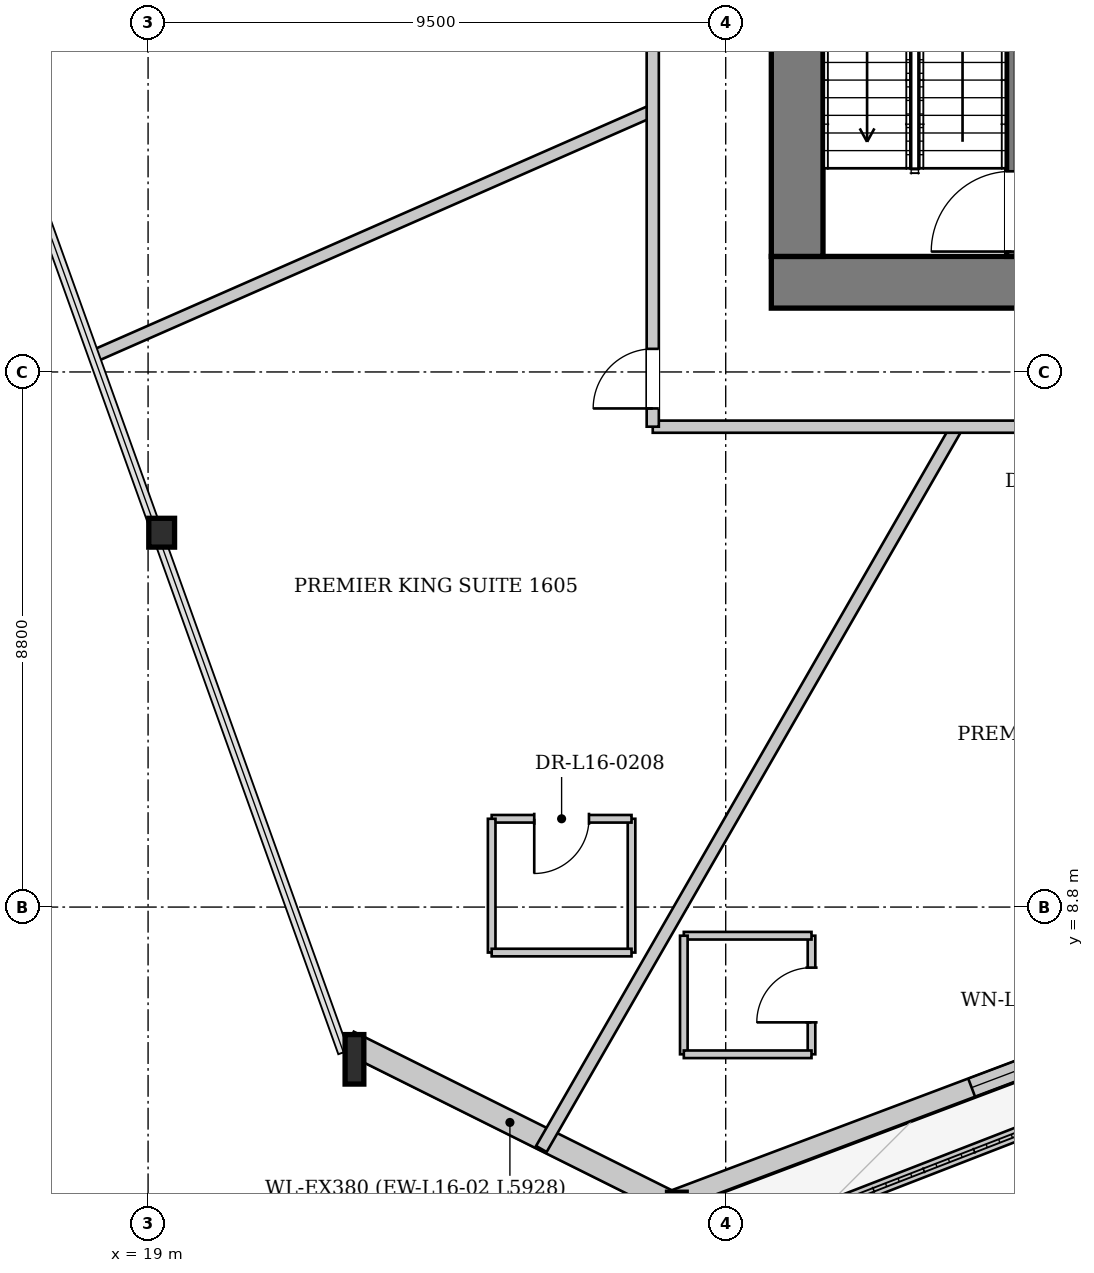
"""IFC4 building model, lengths in metres.
Left out: names, types, materials, properties, quantities, classifications, styles, units other than length and angle.
Written with IfcOpenShell. Run it as: python <this file> out.ifc"""

import sys

from ifc_helpers import new_model, si_unit, direction, frame, frame_2d, origin, origin_2d, place, context, subcontext, project, spatial, rectangle, i_section, extrude, source, transform, mapped, element, fill, save


model = new_model("IFC4")
c1 = context("Model", 3, precision=1e-05, world=origin(), true_north=direction((0.0, 1.0)))
c2 = subcontext(c1, "Body", "Model", "MODEL_VIEW")
j1 = project(units=[si_unit("LENGTHUNIT", "METRE"), si_unit("PLANEANGLEUNIT", "RADIAN")], contexts=[c1])
p1 = place(None, origin())
s1 = spatial("IfcSite", under=j1, at=p1, CompositionType="ELEMENT")
p2 = place(p1, origin())
s2 = spatial("IfcBuilding", under=s1, at=p2, CompositionType="ELEMENT")
p3 = place(p2, frame((0.0, 0.0, 64.8)))
s3 = spatial("IfcBuildingStorey", under=s2, at=p3, CompositionType="ELEMENT", Elevation=64.8)
m1 = source(origin(), c2, "Body", "SweptSolid", [
    extrude(i_section(OverallWidth=0.424, OverallDepth=0.474, WebThickness=0.043, FlangeThickness=0.068, at=origin_2d()), origin(), (0.0, 0.0, 1.0), 3.406),
])
p4 = place(p3, frame((19.098, 15.097, 0.0), z_axis=(0.07368847903, -0.082505291209, 0.993862608704), x_axis=(0.745834176897, 0.666131654084, 0.0)))
e1 = element("IfcColumn", 1, at=p4, inside=s3, PredefinedType="COLUMN", context=c2, shape_type="MappedRepresentation", body=[
    mapped(m1, transform((0.0, 0.0, 0.0), x_axis=(1.0, 0.0, 0.0), y_axis=(0.0, 1.0, 0.0), z_axis=(0.0, 0.0, 1.0), scale=1.0)),
])
m2 = source(origin(), c2, "Body", "SweptSolid", [
    extrude(i_section(OverallWidth=0.308, OverallDepth=0.814, WebThickness=0.021, FlangeThickness=0.04, at=origin_2d()), origin(), (0.0, 0.0, 1.0), 3.412),
])
p5 = place(p3, frame((22.214, 6.411, 0.0), z_axis=(0.105901272253, -0.067118509036, 0.992108878239), x_axis=(0.535323603489, 0.844647050281, 0.0)))
e2 = element("IfcColumn", 2, at=p5, inside=s3, PredefinedType="COLUMN", context=c2, shape_type="MappedRepresentation", body=[
    mapped(m2, transform((0.0, 0.0, 0.0), x_axis=(1.0, 0.0, 0.0), y_axis=(0.0, 1.0, 0.0), z_axis=(0.0, 0.0, 1.0), scale=1.0)),
])
p6 = place(p3, frame((50.249, 12.503, 0.0), z_axis=(0.0, 0.0, 1.0), x_axis=(-0.935754406197, -0.352652366054, 0.0)))
e3 = element("IfcWall", 3, at=p6, inside=s3, PredefinedType="SOLIDWALL", context=c2, shape_type="SweptSolid", body=[
    extrude(rectangle(XDim=24.352, YDim=0.32, at=frame_2d((12.176, 0.0))), origin(), (0.0, 0.0, 1.0), 2.592),
])
p7 = place(p6, frame((7.242, 0.0, 0.0)))
e4 = element("IfcOpeningElement", 4, at=p7, cuts=e3, PredefinedType="OPENING", context=c2, shape_type="SweptSolid", body=[
    extrude(rectangle(XDim=1.1, YDim=2.3, at=frame_2d((0.55, 1.15))), frame((0.0, 0.17, 0.0), z_axis=(0.0, -1.0, 0.0), x_axis=(1.0, 0.0, 0.0)), (0.0, 0.0, 1.0), 0.34),
])
p8 = place(p6, frame((17.12, 0.0, 0.272)))
e5 = element("IfcOpeningElement", 5, at=p8, cuts=e3, PredefinedType="OPENING", context=c2, shape_type="SweptSolid", body=[
    extrude(rectangle(XDim=1.8, YDim=2.2, at=frame_2d((0.9, 1.1))), frame((0.0, 0.17, 0.0), z_axis=(0.0, -1.0, 0.0), x_axis=(1.0, 0.0, 0.0)), (0.0, 0.0, 1.0), 0.34),
])
p9 = place(p3, frame((27.603, 3.936, 0.0), z_axis=(0.0, 0.0, 1.0), x_axis=(-0.894929094808, 0.446208376508, 0.0)))
e6 = element("IfcWall", 6, at=p9, inside=s3, PredefinedType="SOLIDWALL", context=c2, shape_type="SweptSolid", body=[
    extrude(rectangle(XDim=5.928, YDim=0.38, at=frame_2d((2.964, 0.0))), origin(), (0.0, 0.0, 1.0), 2.592),
])
p10 = place(p3, frame((28.714, 3.29, 0.0), z_axis=(0.0, 0.0, 1.0), x_axis=(0.932244858771, 0.361828030003, 0.0)))
e7 = element("IfcWall", 7, at=p10, inside=s3, PredefinedType="PARAPET", context=c2, shape_type="SweptSolid", body=[
    extrude(rectangle(XDim=21.613, YDim=0.22, at=frame_2d((10.807, 0.0))), origin(), (0.0, 0.0, 1.0), 0.3),
])
p11 = place(p3, frame((46.75, 19.075, 0.0), z_axis=(0.0, 0.0, 1.0), x_axis=(-1.0, 0.0, 0.0)))
e8 = element("IfcWall", 8, at=p11, inside=s3, PredefinedType="SHEAR", context=c2, shape_type="SweptSolid", body=[
    extrude(rectangle(XDim=17.5, YDim=0.85, at=frame_2d((8.75, 0.0))), origin(), (0.0, 0.0, 1.0), 3.3),
])
p12 = place(p11, frame((4.95, 0.0, 0.0)))
e9 = element("IfcOpeningElement", 9, at=p12, cuts=e8, PredefinedType="OPENING", context=c2, shape_type="SweptSolid", body=[
    extrude(rectangle(XDim=1.12, YDim=2.25, at=frame_2d((0.56, 1.125))), frame((0.0, 0.435, 0.0), z_axis=(0.0, -1.0, 0.0), x_axis=(1.0, 0.0, 0.0)), (0.0, 0.0, 1.0), 0.87),
])
p13 = place(p11, frame((11.45, 0.0, 0.0)))
e10 = element("IfcOpeningElement", 10, at=p13, cuts=e8, PredefinedType="OPENING", context=c2, shape_type="SweptSolid", body=[
    extrude(rectangle(XDim=1.12, YDim=2.25, at=frame_2d((0.56, 1.125))), frame((0.0, 0.435, 0.0), z_axis=(0.0, -1.0, 0.0), x_axis=(1.0, 0.0, 0.0)), (0.0, 0.0, 1.0), 0.87),
])
p14 = place(p3, frame((29.675, 19.5, 0.0), z_axis=(0.0, 0.0, 1.0), x_axis=(0.0, 1.0, 0.0)))
e11 = element("IfcWall", 11, at=p14, inside=s3, PredefinedType="SHEAR", context=c2, shape_type="SweptSolid", body=[
    extrude(rectangle(XDim=14.2, YDim=0.85, at=frame_2d((7.1, 0.0))), origin(), (0.0, 0.0, 1.0), 3.3),
])
p15 = place(p14, frame((7.42, 0.0, 0.0)))
e12 = element("IfcOpeningElement", 12, at=p15, cuts=e11, PredefinedType="OPENING", context=c2, shape_type="SweptSolid", body=[
    extrude(rectangle(XDim=1.6, YDim=2.2, at=frame_2d((0.8, 1.1))), frame((0.0, 0.435, 0.0), z_axis=(0.0, -1.0, 0.0), x_axis=(1.0, 0.0, 0.0)), (0.0, 0.0, 1.0), 0.87),
])
p16 = place(p3, frame((33.2, 19.5, 0.0), z_axis=(0.0, 0.0, 1.0), x_axis=(0.0, 1.0, 0.0)))
e13 = element("IfcWall", 13, at=p16, inside=s3, PredefinedType="PARTITIONING", context=c2, shape_type="SweptSolid", body=[
    extrude(rectangle(XDim=7.46, YDim=0.16, at=frame_2d((3.73, 0.0))), origin(), (0.0, 0.0, 1.0), 3.3),
])
p17 = place(p16, frame((0.08, 0.0, 0.0)))
e14 = element("IfcOpeningElement", 14, at=p17, cuts=e13, PredefinedType="OPENING", context=c2, shape_type="SweptSolid", body=[
    extrude(rectangle(XDim=1.32, YDim=2.2, at=frame_2d((0.66, 1.1))), frame((0.0, 0.09, 0.0), z_axis=(0.0, -1.0, 0.0), x_axis=(1.0, 0.0, 0.0)), (0.0, 0.0, 1.0), 0.18),
])
p18 = place(p3, frame((27.3, 21.899, 0.0), z_axis=(0.0, 0.0, 1.0), x_axis=(-0.915540001972, -0.402226931955, 0.0)))
e15 = element("IfcWall", 15, at=p18, inside=s3, PredefinedType="PARTITIONING", context=c2, shape_type="SweptSolid", body=[
    extrude(rectangle(XDim=10.011, YDim=0.2, at=frame_2d((5.005, 0.0))), origin(), (0.0, 0.0, 1.0), 3.3),
])
p19 = place(p3, frame((32.303, 16.7, 0.0), z_axis=(0.0, 0.0, 1.0), x_axis=(-0.498759278796, -0.866740550462, 0.0)))
e16 = element("IfcWall", 16, at=p19, inside=s3, PredefinedType="PARTITIONING", context=c2, shape_type="SweptSolid", body=[
    extrude(rectangle(XDim=13.704, YDim=0.2, at=frame_2d((6.852, 0.0))), origin(), (0.0, 0.0, 1.0), 3.3),
])
p20 = place(p3, frame((26.951, 8.052, 0.0), z_axis=(0.0, 0.0, 1.0), x_axis=(0.0, 1.0, 0.0)))
e17 = element("IfcWall", 17, at=p20, inside=s3, PredefinedType="PARTITIONING", context=c2, shape_type="SweptSolid", body=[
    extrude(rectangle(XDim=2.2, YDim=0.125, at=frame_2d((1.1, 0.0))), origin(), (0.0, 0.0, 1.0), 3.3),
])
p21 = place(p3, frame((26.951, 10.252, 0.0), z_axis=(0.0, 0.0, 1.0), x_axis=(-1.0, 0.0, 0.0)))
e18 = element("IfcWall", 18, at=p21, inside=s3, PredefinedType="PARTITIONING", context=c2, shape_type="SweptSolid", body=[
    extrude(rectangle(XDim=2.3, YDim=0.125, at=frame_2d((1.15, 0.0))), origin(), (0.0, 0.0, 1.0), 3.3),
])
p22 = place(p21, frame((0.7, 0.0, 0.0)))
e19 = element("IfcOpeningElement", 19, at=p22, cuts=e18, PredefinedType="OPENING", context=c2, shape_type="SweptSolid", body=[
    extrude(rectangle(XDim=0.9, YDim=2.1, at=frame_2d((0.45, 1.05))), frame((0.0, 0.073, 0.0), z_axis=(0.0, -1.0, 0.0), x_axis=(1.0, 0.0, 0.0)), (0.0, 0.0, 1.0), 0.145),
])
p23 = place(p3, frame((24.651, 10.252, 0.0), z_axis=(0.0, 0.0, 1.0), x_axis=(0.0, -1.0, 0.0)))
e20 = element("IfcWall", 20, at=p23, inside=s3, PredefinedType="PARTITIONING", context=c2, shape_type="SweptSolid", body=[
    extrude(rectangle(XDim=2.2, YDim=0.125, at=frame_2d((1.1, 0.0))), origin(), (0.0, 0.0, 1.0), 3.3),
])
p24 = place(p3, frame((24.651, 8.052, 0.0), z_axis=(0.0, 0.0, 1.0), x_axis=(1.0, 0.0, 0.0)))
e21 = element("IfcWall", 21, at=p24, inside=s3, PredefinedType="PARTITIONING", context=c2, shape_type="SweptSolid", body=[
    extrude(rectangle(XDim=2.3, YDim=0.125, at=frame_2d((1.15, 0.0))), origin(), (0.0, 0.0, 1.0), 3.3),
])
p25 = place(p3, frame((29.911, 6.379, 0.0), z_axis=(0.0, 0.0, 1.0), x_axis=(0.0, 1.0, 0.0)))
e22 = element("IfcWall", 22, at=p25, inside=s3, PredefinedType="PARTITIONING", context=c2, shape_type="SweptSolid", body=[
    extrude(rectangle(XDim=1.95, YDim=0.125, at=frame_2d((0.975, 0.0))), origin(), (0.0, 0.0, 1.0), 2.795),
])
p26 = place(p25, frame((0.525, 0.0, 0.0)))
e23 = element("IfcOpeningElement", 23, at=p26, cuts=e22, PredefinedType="OPENING", context=c2, shape_type="SweptSolid", body=[
    extrude(rectangle(XDim=0.9, YDim=2.1, at=frame_2d((0.45, 1.05))), frame((0.0, 0.073, 0.0), z_axis=(0.0, -1.0, 0.0), x_axis=(1.0, 0.0, 0.0)), (0.0, 0.0, 1.0), 0.145),
])
p27 = place(p3, frame((29.911, 8.329, 0.0), z_axis=(0.0, 0.0, 1.0), x_axis=(-1.0, 0.0, 0.0)))
e24 = element("IfcWall", 24, at=p27, inside=s3, PredefinedType="PARTITIONING", context=c2, shape_type="SweptSolid", body=[
    extrude(rectangle(XDim=2.1, YDim=0.125, at=frame_2d((1.05, 0.0))), origin(), (0.0, 0.0, 1.0), 3.3),
])
p28 = place(p3, frame((27.811, 8.329, 0.0), z_axis=(0.0, 0.0, 1.0), x_axis=(0.0, -1.0, 0.0)))
e25 = element("IfcWall", 25, at=p28, inside=s3, PredefinedType="PARTITIONING", context=c2, shape_type="SweptSolid", body=[
    extrude(rectangle(XDim=1.95, YDim=0.125, at=frame_2d((0.975, 0.0))), origin(), (0.0, 0.0, 1.0), 3.3),
])
p29 = place(p3, frame((27.811, 6.379, 0.0), z_axis=(0.0, 0.0, 1.0), x_axis=(1.0, 0.0, 0.0)))
e26 = element("IfcWall", 26, at=p29, inside=s3, PredefinedType="PARTITIONING", context=c2, shape_type="SweptSolid", body=[
    extrude(rectangle(XDim=2.1, YDim=0.125, at=frame_2d((1.05, 0.0))), origin(), (0.0, 0.0, 1.0), 3.3),
])
p30 = place(p3, frame((27.3, 16.7, 0.0), z_axis=(0.0, 0.0, 1.0), x_axis=(1.0, 0.0, 0.0)))
e27 = element("IfcWall", 27, at=p30, inside=s3, PredefinedType="PARTITIONING", context=c2, shape_type="SweptSolid", body=[
    extrude(rectangle(XDim=21.4, YDim=0.2, at=frame_2d((10.7, 0.0))), origin(), (0.0, 0.0, 1.0), 3.3),
])
p31 = place(p30, frame((7.0, 0.0, 0.0)))
e28 = element("IfcOpeningElement", 28, at=p31, cuts=e27, PredefinedType="OPENING", context=c2, shape_type="SweptSolid", body=[
    extrude(rectangle(XDim=0.98, YDim=2.15, at=frame_2d((0.49, 1.075))), frame((0.0, 0.11, 0.0), z_axis=(0.0, -1.0, 0.0), x_axis=(1.0, 0.0, 0.0)), (0.0, 0.0, 1.0), 0.22),
])
p32 = place(p30, frame((17.868, 0.0, 0.0)))
e29 = element("IfcOpeningElement", 29, at=p32, cuts=e27, PredefinedType="OPENING", context=c2, shape_type="SweptSolid", body=[
    extrude(rectangle(XDim=0.98, YDim=2.15, at=frame_2d((0.49, 1.075))), frame((0.0, 0.11, 0.0), z_axis=(0.0, -1.0, 0.0), x_axis=(1.0, 0.0, 0.0)), (0.0, 0.0, 1.0), 0.22),
])
p33 = place(p3, frame((27.3, 16.7, 0.0), z_axis=(0.0, 0.0, 1.0), x_axis=(0.0, 1.0, 0.0)))
e30 = element("IfcWall", 30, at=p33, inside=s3, PredefinedType="PARTITIONING", context=c2, shape_type="SweptSolid", body=[
    extrude(rectangle(XDim=19.8, YDim=0.2, at=frame_2d((9.9, 0.0))), origin(), (0.0, 0.0, 1.0), 3.3),
])
p34 = place(p33, frame((8.604, 0.0, 0.0)))
e31 = element("IfcOpeningElement", 31, at=p34, cuts=e30, PredefinedType="OPENING", context=c2, shape_type="SweptSolid", body=[
    extrude(rectangle(XDim=0.98, YDim=2.15, at=frame_2d((0.49, 1.075))), frame((0.0, 0.11, 0.0), z_axis=(0.0, -1.0, 0.0), x_axis=(1.0, 0.0, 0.0)), (0.0, 0.0, 1.0), 0.22),
])
p35 = place(p33, frame((0.3, 0.0, 0.0)))
e32 = element("IfcOpeningElement", 32, at=p35, cuts=e30, PredefinedType="OPENING", context=c2, shape_type="SweptSolid", body=[
    extrude(rectangle(XDim=0.98, YDim=2.15, at=frame_2d((0.49, 1.075))), frame((0.0, 0.11, 0.0), z_axis=(0.0, -1.0, 0.0), x_axis=(1.0, 0.0, 0.0)), (0.0, 0.0, 1.0), 0.22),
])
m3 = source(origin(), c2, "Body", "SweptSolid", [
    extrude(rectangle(XDim=1.8, YDim=2.2, at=frame_2d((0.9, 1.1))), frame((0.0, 0.03, 0.0), z_axis=(0.0, -1.0, 0.0), x_axis=(1.0, 0.0, 0.0)), (0.0, 0.0, 1.0), 0.06),
])
p36 = place(p8, origin())
e33 = element("IfcWindow", 33, at=p36, inside=s3, PartitioningType="SINGLE_PANEL", PredefinedType="WINDOW", context=c2, shape_type="MappedRepresentation", body=[
    mapped(m3, transform((0.0, 0.0, 0.0), x_axis=(1.0, 0.0, 0.0), y_axis=(0.0, 1.0, 0.0), z_axis=(0.0, 0.0, 1.0), scale=1.0)),
])
fill(e5, e33)
m4 = source(origin(), c2, "Body", "SweptSolid", [
    extrude(rectangle(XDim=1.32, YDim=2.2, at=frame_2d((0.66, 1.1))), frame((0.0, 0.025, 0.0), z_axis=(0.0, -1.0, 0.0), x_axis=(1.0, 0.0, 0.0)), (0.0, 0.0, 1.0), 0.05),
])
p37 = place(p17, origin())
e34 = element("IfcDoor", 34, at=p37, inside=s3, OperationType="SINGLE_SWING_LEFT", PredefinedType="DOOR", context=c2, shape_type="MappedRepresentation", body=[
    mapped(m4, transform((0.0, 0.0, 0.0), x_axis=(1.0, 0.0, 0.0), y_axis=(0.0, 1.0, 0.0), z_axis=(0.0, 0.0, 1.0), scale=1.0)),
])
fill(e14, e34)
m5 = source(origin(), c2, "Body", "SweptSolid", [
    extrude(rectangle(XDim=0.9, YDim=2.1, at=frame_2d((0.45, 1.05))), frame((0.0, 0.025, 0.0), z_axis=(0.0, -1.0, 0.0), x_axis=(1.0, 0.0, 0.0)), (0.0, 0.0, 1.0), 0.05),
])
p38 = place(p22, origin())
e35 = element("IfcDoor", 35, at=p38, inside=s3, OperationType="SINGLE_SWING_RIGHT", PredefinedType="DOOR", context=c2, shape_type="MappedRepresentation", body=[
    mapped(m5, transform((0.0, 0.0, 0.0), x_axis=(1.0, 0.0, 0.0), y_axis=(0.0, 1.0, 0.0), z_axis=(0.0, 0.0, 1.0), scale=1.0)),
])
fill(e19, e35)
p39 = place(p26, origin())
e36 = element("IfcDoor", 36, at=p39, inside=s3, OperationType="SINGLE_SWING_LEFT", PredefinedType="DOOR", context=c2, shape_type="MappedRepresentation", body=[
    mapped(m5, transform((0.0, 0.0, 0.0), x_axis=(1.0, 0.0, 0.0), y_axis=(0.0, 1.0, 0.0), z_axis=(0.0, 0.0, 1.0), scale=1.0)),
])
fill(e23, e36)
m6 = source(origin(), c2, "Body", "SweptSolid", [
    extrude(rectangle(XDim=0.98, YDim=2.15, at=frame_2d((0.49, 1.075))), frame((0.0, 0.025, 0.0), z_axis=(0.0, -1.0, 0.0), x_axis=(1.0, 0.0, 0.0)), (0.0, 0.0, 1.0), 0.05),
])
p40 = place(p35, origin())
e37 = element("IfcDoor", 37, at=p40, inside=s3, OperationType="SINGLE_SWING_LEFT", PredefinedType="DOOR", context=c2, shape_type="MappedRepresentation", body=[
    mapped(m6, transform((0.0, 0.0, 0.0), x_axis=(1.0, 0.0, 0.0), y_axis=(0.0, 1.0, 0.0), z_axis=(0.0, 0.0, 1.0), scale=1.0)),
])
fill(e32, e37)
save(model, sys.argv[1])
